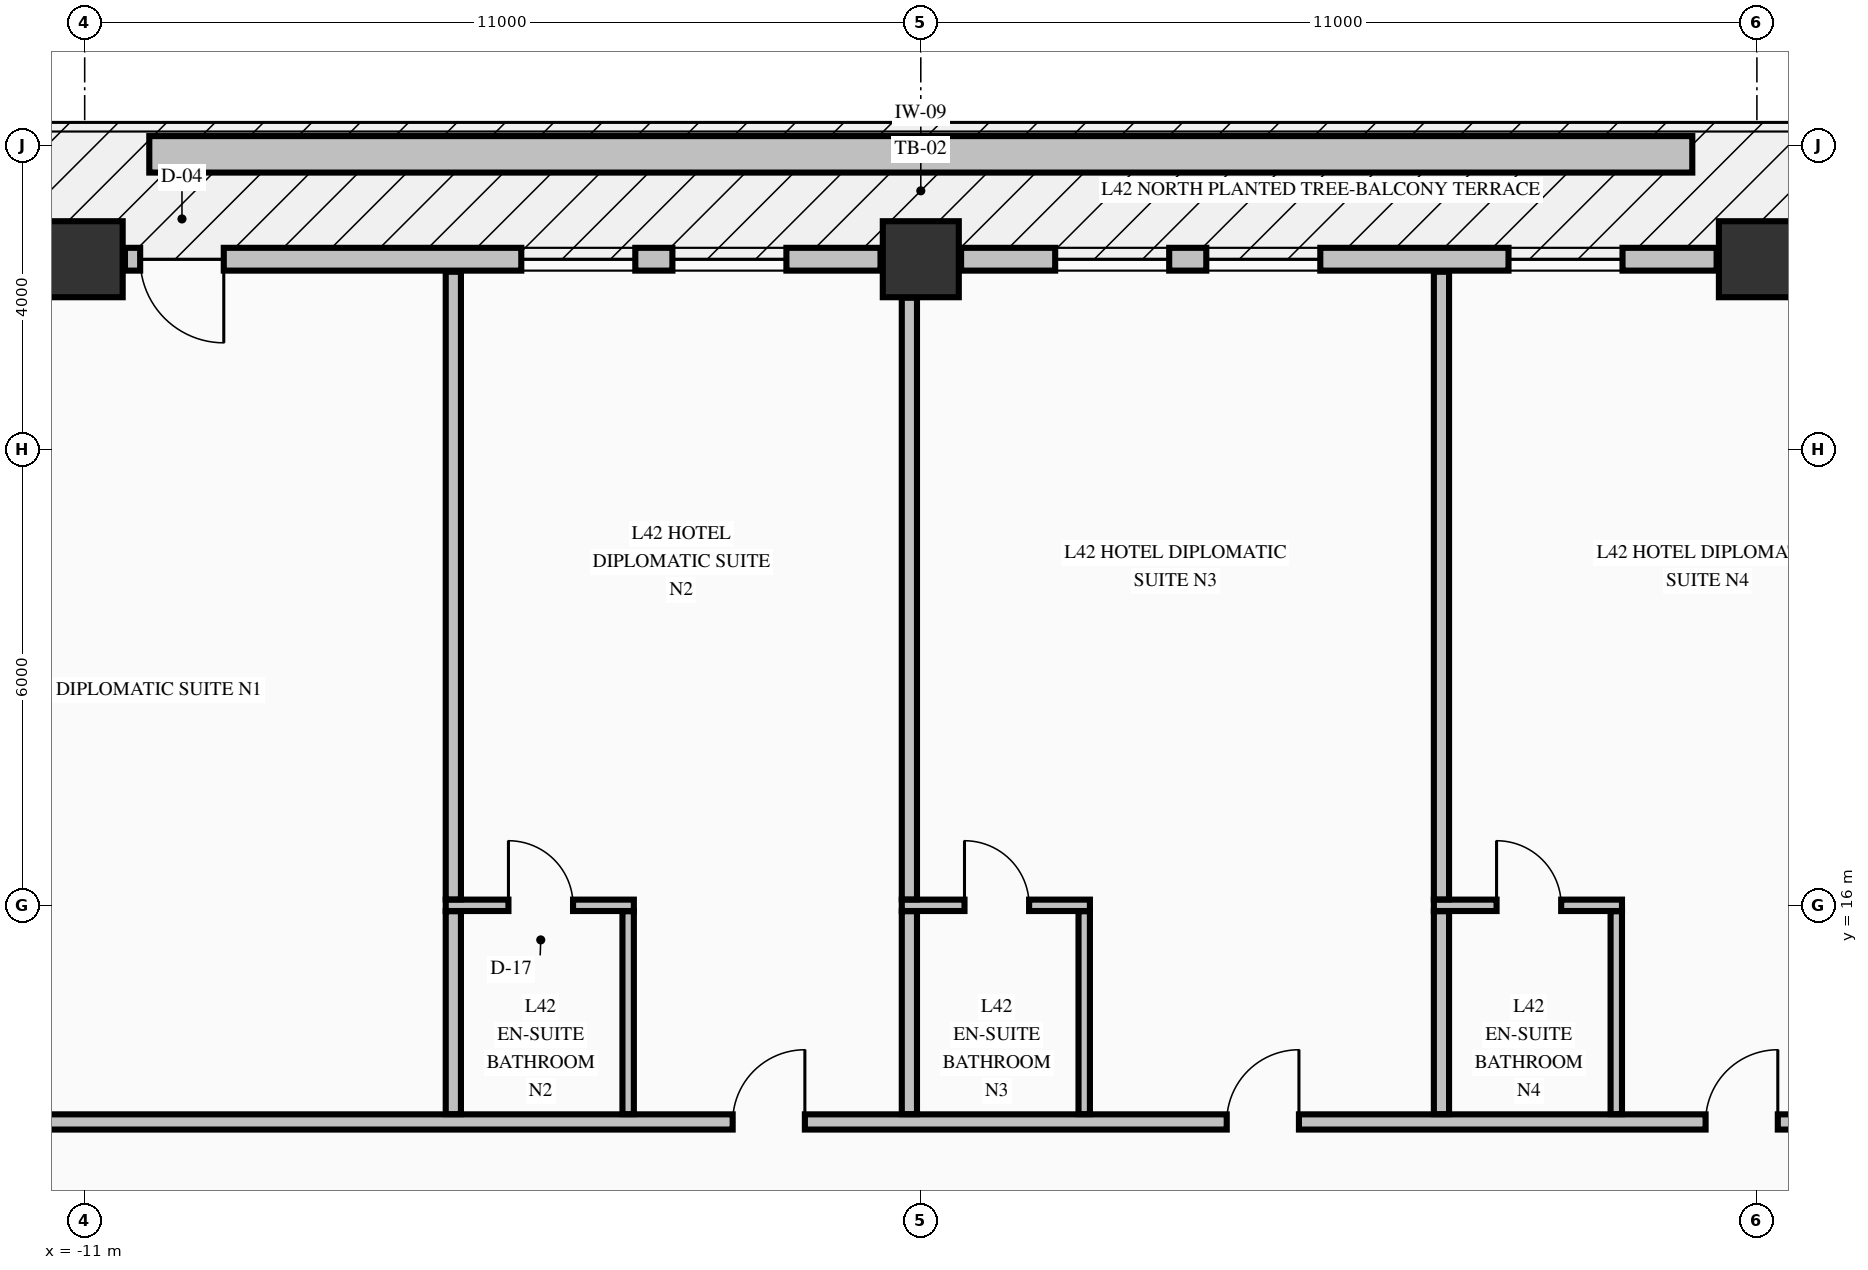
"""IFC4 building model, lengths in metres.
Left out: names, types, materials, properties, quantities, classifications, styles, units other than length and angle.
Written with IfcOpenShell. Run it as: python <this file> out.ifc"""

import sys

from ifc_helpers import new_model, si_unit, direction, frame, frame_2d, origin, origin_2d, place, context, subcontext, project, spatial, rectangle, extrude, element, fill, save


model = new_model("IFC4")
c1 = context("Model", 3, precision=1e-05, world=origin(), true_north=direction((0.0, 1.0)))
c2 = subcontext(c1, "Body", "Model", "MODEL_VIEW")
j1 = project(units=[si_unit("LENGTHUNIT", "METRE"), si_unit("PLANEANGLEUNIT", "RADIAN")], contexts=[c1])
p1 = place(None, origin())
s1 = spatial("IfcSite", under=j1, at=p1, CompositionType="ELEMENT")
p2 = place(p1, origin())
s2 = spatial("IfcBuilding", under=s1, at=p2, CompositionType="ELEMENT")
p3 = place(p2, frame((0.0, 0.0, 166.06)))
s3 = spatial("IfcBuildingStorey", under=s2, at=p3, CompositionType="ELEMENT", Elevation=166.06)
for number, where, z_axis, x_axis in (
    (1, (-11.0, 24.5, -0.25), (0.0, 0.0, 1.0), (1.0, 0.0, 0.0)),
    (2, (0.0, 24.5, -0.25), (0.0, 0.0, 1.0), (1.0, 0.0, 0.0)),
    (3, (11.0, 24.5, -0.25), (0.0, 0.0, 1.0), (1.0, 0.0, 0.0)),
):
    element("IfcColumn", number, at=place(p3, frame(where, z_axis=z_axis, x_axis=x_axis)), inside=s3, PredefinedType="COLUMN", context=c2, shape_type="SweptSolid", body=[
        extrude(rectangle(XDim=1.0, YDim=1.0, at=origin_2d()), origin(), (0.0, 0.0, 1.0), 3.4),
    ])
p4 = place(p3, frame((-0.53, 24.5, 0.0), z_axis=(0.0, 0.0, 1.0), x_axis=(-1.0, 0.0, 0.0)))
e4 = element("IfcWall", 4, at=p4, inside=s3, PredefinedType="STANDARD", context=c2, shape_type="SweptSolid", body=[
    extrude(rectangle(XDim=9.94, YDim=0.3, at=frame_2d((4.97, 0.0))), origin(), (0.0, 0.0, 1.0), 2.542),
])
p5 = place(p4, frame((8.64, 0.0, 0.0)))
e5 = element("IfcOpeningElement", 5, at=p5, cuts=e4, PredefinedType="OPENING", context=c2, shape_type="SweptSolid", body=[
    extrude(rectangle(XDim=1.1, YDim=2.15, at=frame_2d((0.55, 1.075))), frame((0.0, 0.16, 0.0), z_axis=(0.0, -1.0, 0.0), x_axis=(1.0, 0.0, 0.0)), (0.0, 0.0, 1.0), 0.32),
])
p6 = place(p4, frame((1.238, 0.0, 0.72)))
e6 = element("IfcOpeningElement", 6, at=p6, cuts=e4, PredefinedType="OPENING", context=c2, shape_type="SweptSolid", body=[
    extrude(rectangle(XDim=1.5, YDim=1.6, at=frame_2d((0.75, 0.8))), frame((0.0, 0.16, 0.0), z_axis=(0.0, -1.0, 0.0), x_axis=(1.0, 0.0, 0.0)), (0.0, 0.0, 1.0), 0.32),
])
p7 = place(p4, frame((3.226, 0.0, 0.72)))
e7 = element("IfcOpeningElement", 7, at=p7, cuts=e4, PredefinedType="OPENING", context=c2, shape_type="SweptSolid", body=[
    extrude(rectangle(XDim=1.5, YDim=1.6, at=frame_2d((0.75, 0.8))), frame((0.0, 0.16, 0.0), z_axis=(0.0, -1.0, 0.0), x_axis=(1.0, 0.0, 0.0)), (0.0, 0.0, 1.0), 0.32),
])
p8 = place(p3, frame((10.47, 24.5, 0.0), z_axis=(0.0, 0.0, 1.0), x_axis=(-1.0, 0.0, 0.0)))
e8 = element("IfcWall", 8, at=p8, inside=s3, PredefinedType="STANDARD", context=c2, shape_type="SweptSolid", body=[
    extrude(rectangle(XDim=9.94, YDim=0.3, at=frame_2d((4.97, 0.0))), origin(), (0.0, 0.0, 1.0), 2.542),
])
p9 = place(p8, frame((1.238, 0.0, 0.72)))
e9 = element("IfcOpeningElement", 9, at=p9, cuts=e8, PredefinedType="OPENING", context=c2, shape_type="SweptSolid", body=[
    extrude(rectangle(XDim=1.5, YDim=1.6, at=frame_2d((0.75, 0.8))), frame((0.0, 0.16, 0.0), z_axis=(0.0, -1.0, 0.0), x_axis=(1.0, 0.0, 0.0)), (0.0, 0.0, 1.0), 0.32),
])
p10 = place(p8, frame((5.214, 0.0, 0.72)))
e10 = element("IfcOpeningElement", 10, at=p10, cuts=e8, PredefinedType="OPENING", context=c2, shape_type="SweptSolid", body=[
    extrude(rectangle(XDim=1.5, YDim=1.6, at=frame_2d((0.75, 0.8))), frame((0.0, 0.16, 0.0), z_axis=(0.0, -1.0, 0.0), x_axis=(1.0, 0.0, 0.0)), (0.0, 0.0, 1.0), 0.32),
])
p11 = place(p8, frame((7.202, 0.0, 0.72)))
e11 = element("IfcOpeningElement", 11, at=p11, cuts=e8, PredefinedType="OPENING", context=c2, shape_type="SweptSolid", body=[
    extrude(rectangle(XDim=1.5, YDim=1.6, at=frame_2d((0.75, 0.8))), frame((0.0, 0.16, 0.0), z_axis=(0.0, -1.0, 0.0), x_axis=(1.0, 0.0, 0.0)), (0.0, 0.0, 1.0), 0.32),
])
p12 = place(p3, frame((-17.1, 13.15, 0.0), z_axis=(0.0, 0.0, 1.0), x_axis=(1.0, 0.0, 0.0)))
e12 = element("IfcWall", 12, at=p12, inside=s3, PredefinedType="PARTITIONING", context=c2, shape_type="SweptSolid", body=[
    extrude(rectangle(XDim=39.2, YDim=0.2, at=frame_2d((19.6, 0.0))), origin(), (0.0, 0.0, 1.0), 3.15),
])
p13 = place(p12, frame((3.575, 0.0, 0.0)))
e13 = element("IfcOpeningElement", 13, at=p13, cuts=e12, PredefinedType="OPENING", context=c2, shape_type="SweptSolid", body=[
    extrude(rectangle(XDim=0.95, YDim=2.15, at=frame_2d((0.475, 1.075))), frame((0.0, 0.11, 0.0), z_axis=(0.0, -1.0, 0.0), x_axis=(1.0, 0.0, 0.0)), (0.0, 0.0, 1.0), 0.22),
])
p14 = place(p12, frame((14.625, 0.0, 0.0)))
e14 = element("IfcOpeningElement", 14, at=p14, cuts=e12, PredefinedType="OPENING", context=c2, shape_type="SweptSolid", body=[
    extrude(rectangle(XDim=0.95, YDim=2.15, at=frame_2d((0.475, 1.075))), frame((0.0, 0.11, 0.0), z_axis=(0.0, -1.0, 0.0), x_axis=(1.0, 0.0, 0.0)), (0.0, 0.0, 1.0), 0.22),
])
p15 = place(p12, frame((21.125, 0.0, 0.0)))
e15 = element("IfcOpeningElement", 15, at=p15, cuts=e12, PredefinedType="OPENING", context=c2, shape_type="SweptSolid", body=[
    extrude(rectangle(XDim=0.95, YDim=2.15, at=frame_2d((0.475, 1.075))), frame((0.0, 0.11, 0.0), z_axis=(0.0, -1.0, 0.0), x_axis=(1.0, 0.0, 0.0)), (0.0, 0.0, 1.0), 0.22),
])
p16 = place(p12, frame((27.425, 0.0, 0.0)))
e16 = element("IfcOpeningElement", 16, at=p16, cuts=e12, PredefinedType="OPENING", context=c2, shape_type="SweptSolid", body=[
    extrude(rectangle(XDim=0.95, YDim=2.15, at=frame_2d((0.475, 1.075))), frame((0.0, 0.11, 0.0), z_axis=(0.0, -1.0, 0.0), x_axis=(1.0, 0.0, 0.0)), (0.0, 0.0, 1.0), 0.22),
])
p17 = place(p12, frame((34.605, 0.0, 0.0)))
e17 = element("IfcOpeningElement", 17, at=p17, cuts=e12, PredefinedType="OPENING", context=c2, shape_type="SweptSolid", body=[
    extrude(rectangle(XDim=0.95, YDim=2.15, at=frame_2d((0.475, 1.075))), frame((0.0, 0.11, 0.0), z_axis=(0.0, -1.0, 0.0), x_axis=(1.0, 0.0, 0.0)), (0.0, 0.0, 1.0), 0.22),
])
p18 = place(p3, frame((-6.25, 16.0, 0.0), z_axis=(0.0, 0.0, 1.0), x_axis=(1.0, 0.0, 0.0)))
e18 = element("IfcWall", 18, at=p18, inside=s3, PredefinedType="PARTITIONING", context=c2, shape_type="SweptSolid", body=[
    extrude(rectangle(XDim=2.475, YDim=0.15, at=frame_2d((1.238, 0.0))), origin(), (0.0, 0.0, 1.0), 3.15),
])
p19 = place(p18, frame((0.825, 0.0, 0.0)))
e19 = element("IfcOpeningElement", 19, at=p19, cuts=e18, PredefinedType="OPENING", context=c2, shape_type="SweptSolid", body=[
    extrude(rectangle(XDim=0.85, YDim=2.1, at=frame_2d((0.425, 1.05))), frame((0.0, 0.085, 0.0), z_axis=(0.0, -1.0, 0.0), x_axis=(1.0, 0.0, 0.0)), (0.0, 0.0, 1.0), 0.17),
])
p20 = place(p3, frame((-0.25, 16.0, 0.0), z_axis=(0.0, 0.0, 1.0), x_axis=(1.0, 0.0, 0.0)))
e20 = element("IfcWall", 20, at=p20, inside=s3, PredefinedType="PARTITIONING", context=c2, shape_type="SweptSolid", body=[
    extrude(rectangle(XDim=2.475, YDim=0.15, at=frame_2d((1.238, 0.0))), origin(), (0.0, 0.0, 1.0), 3.15),
])
p21 = place(p20, frame((0.825, 0.0, 0.0)))
e21 = element("IfcOpeningElement", 21, at=p21, cuts=e20, PredefinedType="OPENING", context=c2, shape_type="SweptSolid", body=[
    extrude(rectangle(XDim=0.85, YDim=2.1, at=frame_2d((0.425, 1.05))), frame((0.0, 0.085, 0.0), z_axis=(0.0, -1.0, 0.0), x_axis=(1.0, 0.0, 0.0)), (0.0, 0.0, 1.0), 0.17),
])
p22 = place(p3, frame((6.75, 16.0, 0.0), z_axis=(0.0, 0.0, 1.0), x_axis=(1.0, 0.0, 0.0)))
e22 = element("IfcWall", 22, at=p22, inside=s3, PredefinedType="PARTITIONING", context=c2, shape_type="SweptSolid", body=[
    extrude(rectangle(XDim=2.475, YDim=0.15, at=frame_2d((1.238, 0.0))), origin(), (0.0, 0.0, 1.0), 3.15),
])
p23 = place(p22, frame((0.825, 0.0, 0.0)))
e23 = element("IfcOpeningElement", 23, at=p23, cuts=e22, PredefinedType="OPENING", context=c2, shape_type="SweptSolid", body=[
    extrude(rectangle(XDim=0.85, YDim=2.1, at=frame_2d((0.425, 1.05))), frame((0.0, 0.085, 0.0), z_axis=(0.0, -1.0, 0.0), x_axis=(1.0, 0.0, 0.0)), (0.0, 0.0, 1.0), 0.17),
])
p24 = place(p3, frame((-6.15, 13.253, 0.0), z_axis=(0.0, 0.0, 1.0), x_axis=(0.0, 1.0, 0.0)))
e24 = element("IfcWall", 24, at=p24, inside=s3, PredefinedType="PARTITIONING", context=c2, shape_type="SweptSolid", body=[
    extrude(rectangle(XDim=2.669, YDim=0.2, at=frame_2d((1.334, 0.0))), origin(), (0.0, 0.0, 1.0), 3.15),
])
p25 = place(p3, frame((-6.15, 16.078, 0.0), z_axis=(0.0, 0.0, 1.0), x_axis=(0.0, 1.0, 0.0)))
e25 = element("IfcWall", 25, at=p25, inside=s3, PredefinedType="PARTITIONING", context=c2, shape_type="SweptSolid", body=[
    extrude(rectangle(XDim=8.257, YDim=0.2, at=frame_2d((4.128, 0.0))), origin(), (0.0, 0.0, 1.0), 3.15),
])
p26 = place(p3, frame((-3.85, 13.253, 0.0), z_axis=(0.0, 0.0, 1.0), x_axis=(0.0, 1.0, 0.0)))
e26 = element("IfcWall", 26, at=p26, inside=s3, PredefinedType="PARTITIONING", context=c2, shape_type="SweptSolid", body=[
    extrude(rectangle(XDim=2.669, YDim=0.15, at=frame_2d((1.334, 0.0))), origin(), (0.0, 0.0, 1.0), 3.15),
])
p27 = place(p3, frame((-0.15, 13.253, 0.0), z_axis=(0.0, 0.0, 1.0), x_axis=(0.0, 1.0, 0.0)))
e27 = element("IfcWall", 27, at=p27, inside=s3, PredefinedType="PARTITIONING", context=c2, shape_type="SweptSolid", body=[
    extrude(rectangle(XDim=2.669, YDim=0.2, at=frame_2d((1.334, 0.0))), origin(), (0.0, 0.0, 1.0), 2.342),
])
p28 = place(p3, frame((-0.15, 16.078, 0.0), z_axis=(0.0, 0.0, 1.0), x_axis=(0.0, 1.0, 0.0)))
e28 = element("IfcWall", 28, at=p28, inside=s3, PredefinedType="PARTITIONING", context=c2, shape_type="SweptSolid", body=[
    extrude(rectangle(XDim=7.916, YDim=0.2, at=frame_2d((3.958, 0.0))), origin(), (0.0, 0.0, 1.0), 2.342),
])
p29 = place(p3, frame((2.15, 13.253, 0.0), z_axis=(0.0, 0.0, 1.0), x_axis=(0.0, 1.0, 0.0)))
e29 = element("IfcWall", 29, at=p29, inside=s3, PredefinedType="PARTITIONING", context=c2, shape_type="SweptSolid", body=[
    extrude(rectangle(XDim=2.669, YDim=0.15, at=frame_2d((1.334, 0.0))), origin(), (0.0, 0.0, 1.0), 3.15),
])
p30 = place(p3, frame((6.85, 13.253, 0.0), z_axis=(0.0, 0.0, 1.0), x_axis=(0.0, 1.0, 0.0)))
e30 = element("IfcWall", 30, at=p30, inside=s3, PredefinedType="PARTITIONING", context=c2, shape_type="SweptSolid", body=[
    extrude(rectangle(XDim=2.669, YDim=0.2, at=frame_2d((1.334, 0.0))), origin(), (0.0, 0.0, 1.0), 3.15),
])
p31 = place(p3, frame((6.85, 16.078, 0.0), z_axis=(0.0, 0.0, 1.0), x_axis=(0.0, 1.0, 0.0)))
e31 = element("IfcWall", 31, at=p31, inside=s3, PredefinedType="PARTITIONING", context=c2, shape_type="SweptSolid", body=[
    extrude(rectangle(XDim=8.257, YDim=0.2, at=frame_2d((4.128, 0.0))), origin(), (0.0, 0.0, 1.0), 3.15),
])
p32 = place(p3, frame((9.15, 13.253, 0.0), z_axis=(0.0, 0.0, 1.0), x_axis=(0.0, 1.0, 0.0)))
e32 = element("IfcWall", 32, at=p32, inside=s3, PredefinedType="PARTITIONING", context=c2, shape_type="SweptSolid", body=[
    extrude(rectangle(XDim=2.669, YDim=0.15, at=frame_2d((1.334, 0.0))), origin(), (0.0, 0.0, 1.0), 3.15),
])
p33 = place(p3, frame((-10.15, 25.88, -0.04), z_axis=(0.0, 0.0, 1.0), x_axis=(1.0, 0.0, 0.0)))
e33 = element("IfcWall", 33, at=p33, inside=s3, PredefinedType="PARAPET", context=c2, shape_type="SweptSolid", body=[
    extrude(rectangle(XDim=20.3, YDim=0.48, at=frame_2d((10.15, 0.0))), origin(), (0.0, 0.0, 1.0), 0.52),
])
p34 = place(p5, origin())
e34 = element("IfcDoor", 34, at=p34, inside=s3, OperationType="SINGLE_SWING_LEFT", PredefinedType="DOOR", context=c2, shape_type="SweptSolid", body=[
    extrude(rectangle(XDim=1.1, YDim=2.15, at=frame_2d((0.55, 1.075))), frame((0.0, 0.025, 0.0), z_axis=(0.0, -1.0, 0.0), x_axis=(1.0, 0.0, 0.0)), (0.0, 0.0, 1.0), 0.05),
])
fill(e5, e34)
p35 = place(p6, origin())
e35 = element("IfcWindow", 35, at=p35, inside=s3, PartitioningType="SINGLE_PANEL", PredefinedType="WINDOW", context=c2, shape_type="SweptSolid", body=[
    extrude(rectangle(XDim=1.5, YDim=1.6, at=frame_2d((0.75, 0.8))), frame((0.0, 0.03, 0.0), z_axis=(0.0, -1.0, 0.0), x_axis=(1.0, 0.0, 0.0)), (0.0, 0.0, 1.0), 0.06),
])
fill(e6, e35)
p36 = place(p7, origin())
e36 = element("IfcWindow", 36, at=p36, inside=s3, PartitioningType="SINGLE_PANEL", PredefinedType="WINDOW", context=c2, shape_type="SweptSolid", body=[
    extrude(rectangle(XDim=1.5, YDim=1.6, at=frame_2d((0.75, 0.8))), frame((0.0, 0.03, 0.0), z_axis=(0.0, -1.0, 0.0), x_axis=(1.0, 0.0, 0.0)), (0.0, 0.0, 1.0), 0.06),
])
fill(e7, e36)
p37 = place(p9, origin())
e37 = element("IfcWindow", 37, at=p37, inside=s3, PartitioningType="SINGLE_PANEL", PredefinedType="WINDOW", context=c2, shape_type="SweptSolid", body=[
    extrude(rectangle(XDim=1.5, YDim=1.6, at=frame_2d((0.75, 0.8))), frame((0.0, 0.03, 0.0), z_axis=(0.0, -1.0, 0.0), x_axis=(1.0, 0.0, 0.0)), (0.0, 0.0, 1.0), 0.06),
])
fill(e9, e37)
p38 = place(p10, origin())
e38 = element("IfcWindow", 38, at=p38, inside=s3, PartitioningType="SINGLE_PANEL", PredefinedType="WINDOW", context=c2, shape_type="SweptSolid", body=[
    extrude(rectangle(XDim=1.5, YDim=1.6, at=frame_2d((0.75, 0.8))), frame((0.0, 0.03, 0.0), z_axis=(0.0, -1.0, 0.0), x_axis=(1.0, 0.0, 0.0)), (0.0, 0.0, 1.0), 0.06),
])
fill(e10, e38)
p39 = place(p11, origin())
e39 = element("IfcWindow", 39, at=p39, inside=s3, PartitioningType="SINGLE_PANEL", PredefinedType="WINDOW", context=c2, shape_type="SweptSolid", body=[
    extrude(rectangle(XDim=1.5, YDim=1.6, at=frame_2d((0.75, 0.8))), frame((0.0, 0.03, 0.0), z_axis=(0.0, -1.0, 0.0), x_axis=(1.0, 0.0, 0.0)), (0.0, 0.0, 1.0), 0.06),
])
fill(e11, e39)
p40 = place(p14, origin())
e40 = element("IfcDoor", 40, at=p40, inside=s3, OperationType="SINGLE_SWING_RIGHT", PredefinedType="DOOR", context=c2, shape_type="SweptSolid", body=[
    extrude(rectangle(XDim=0.95, YDim=2.15, at=frame_2d((0.475, 1.075))), frame((0.0, 0.025, 0.0), z_axis=(0.0, -1.0, 0.0), x_axis=(1.0, 0.0, 0.0)), (0.0, 0.0, 1.0), 0.05),
])
fill(e14, e40)
p41 = place(p19, origin())
e41 = element("IfcDoor", 41, at=p41, inside=s3, OperationType="SINGLE_SWING_LEFT", PredefinedType="DOOR", context=c2, shape_type="SweptSolid", body=[
    extrude(rectangle(XDim=0.85, YDim=2.1, at=frame_2d((0.425, 1.05))), frame((0.0, 0.025, 0.0), z_axis=(0.0, -1.0, 0.0), x_axis=(1.0, 0.0, 0.0)), (0.0, 0.0, 1.0), 0.05),
])
fill(e19, e41)
p42 = place(p15, origin())
e42 = element("IfcDoor", 42, at=p42, inside=s3, OperationType="SINGLE_SWING_RIGHT", PredefinedType="DOOR", context=c2, shape_type="SweptSolid", body=[
    extrude(rectangle(XDim=0.95, YDim=2.15, at=frame_2d((0.475, 1.075))), frame((0.0, 0.025, 0.0), z_axis=(0.0, -1.0, 0.0), x_axis=(1.0, 0.0, 0.0)), (0.0, 0.0, 1.0), 0.05),
])
fill(e15, e42)
p43 = place(p21, origin())
e43 = element("IfcDoor", 43, at=p43, inside=s3, OperationType="SINGLE_SWING_LEFT", PredefinedType="DOOR", context=c2, shape_type="SweptSolid", body=[
    extrude(rectangle(XDim=0.85, YDim=2.1, at=frame_2d((0.425, 1.05))), frame((0.0, 0.025, 0.0), z_axis=(0.0, -1.0, 0.0), x_axis=(1.0, 0.0, 0.0)), (0.0, 0.0, 1.0), 0.05),
])
fill(e21, e43)
p44 = place(p16, origin())
e44 = element("IfcDoor", 44, at=p44, inside=s3, OperationType="SINGLE_SWING_RIGHT", PredefinedType="DOOR", context=c2, shape_type="SweptSolid", body=[
    extrude(rectangle(XDim=0.95, YDim=2.15, at=frame_2d((0.475, 1.075))), frame((0.0, 0.025, 0.0), z_axis=(0.0, -1.0, 0.0), x_axis=(1.0, 0.0, 0.0)), (0.0, 0.0, 1.0), 0.05),
])
fill(e16, e44)
p45 = place(p23, origin())
e45 = element("IfcDoor", 45, at=p45, inside=s3, OperationType="SINGLE_SWING_LEFT", PredefinedType="DOOR", context=c2, shape_type="SweptSolid", body=[
    extrude(rectangle(XDim=0.85, YDim=2.1, at=frame_2d((0.425, 1.05))), frame((0.0, 0.025, 0.0), z_axis=(0.0, -1.0, 0.0), x_axis=(1.0, 0.0, 0.0)), (0.0, 0.0, 1.0), 0.05),
])
fill(e23, e45)
save(model, sys.argv[1])
